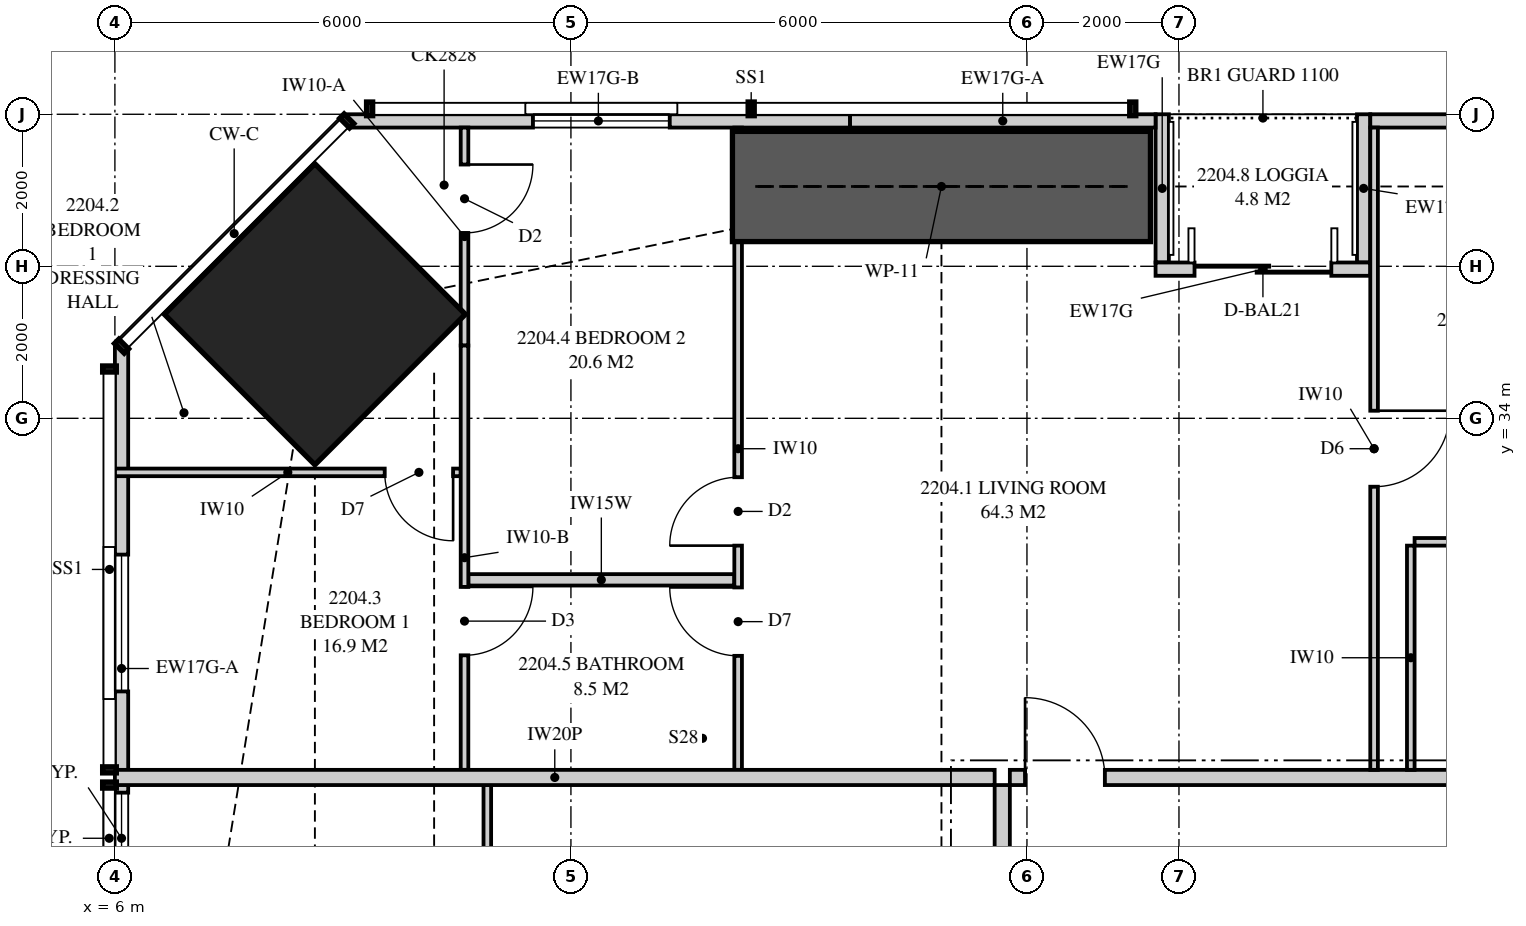
"""IFC4 building model, lengths in metres.
Left out: names, types, materials, properties, quantities, classifications, styles, units other than length and angle.
Written with IfcOpenShell. Run it as: python <this file> out.ifc"""

import sys

from ifc_helpers import new_model, si_unit, direction, frame, frame_2d, origin, origin_2d, place, context, subcontext, project, spatial, polyline, rectangle, hollow_rectangle, outline, extrude, element, fill, save


model = new_model("IFC4")
c1 = context("Model", 3, precision=1e-05, world=origin(), true_north=direction((0.0, 1.0)))
c2 = subcontext(c1, "Body", "Model", "MODEL_VIEW")
j1 = project(units=[si_unit("LENGTHUNIT", "METRE"), si_unit("PLANEANGLEUNIT", "RADIAN")], contexts=[c1])
p1 = place(None, origin())
s1 = spatial("IfcSite", under=j1, at=p1, CompositionType="ELEMENT")
p2 = place(p1, origin())
s2 = spatial("IfcBuilding", under=s1, at=p2, CompositionType="ELEMENT")
p3 = place(p2, frame((0.0, 0.0, 84.75)))
s3 = spatial("IfcBuildingStorey", under=s2, at=p3, CompositionType="ELEMENT", Elevation=84.75)
p4 = place(p3, frame((8.631, 35.369, 0.0), z_axis=(0.0, 0.0, 1.0), x_axis=(0.707106781187, -0.707106781187, 0.0)))
e1 = element("IfcColumn", 1, at=p4, inside=s3, PredefinedType="COLUMN", context=c2, shape_type="SweptSolid", body=[
    extrude(hollow_rectangle(XDim=2.8, YDim=2.8, WallThickness=0.175, at=origin_2d()), origin(), (0.0, 0.0, 1.0), 3.35),
])
p5 = place(p3, frame((30.675, 37.913, 0.0), z_axis=(0.0, 0.0, 1.0), x_axis=(-1.0, 0.0, 0.0)))
e2 = element("IfcWall", 2, at=p5, inside=s3, PredefinedType="SOLIDWALL", context=c2, shape_type="SweptSolid", body=[
    extrude(rectangle(XDim=8.158, YDim=0.175, at=frame_2d((4.079, 0.0))), origin(), (0.0, 0.0, 1.0), 2.15),
])
p6 = place(p5, frame((5.815, 0.0, 0.4)))
e3 = element("IfcOpeningElement", 3, at=p6, cuts=e2, PredefinedType="OPENING", context=c2, shape_type="SweptSolid", body=[
    extrude(rectangle(XDim=1.2, YDim=1.7, at=frame_2d((0.6, 0.85))), frame((0.0, 0.097, 0.0), z_axis=(0.0, -1.0, 0.0), x_axis=(1.0, 0.0, 0.0)), (0.0, 0.0, 1.0), 0.195),
])
p7 = place(p3, frame((19.692, 37.913, 0.0), z_axis=(0.0, 0.0, 1.0), x_axis=(-1.0, 0.0, 0.0)))
e4 = element("IfcWall", 4, at=p7, inside=s3, PredefinedType="SOLIDWALL", context=c2, shape_type="SweptSolid", body=[
    extrude(rectangle(XDim=4.021, YDim=0.175, at=frame_2d((2.011, 0.0))), origin(), (0.0, 0.0, 1.0), 2.15),
])
p8 = place(p3, frame((15.671, 37.913, 0.0), z_axis=(0.0, 0.0, 1.0), x_axis=(-1.0, 0.0, 0.0)))
e5 = element("IfcWall", 5, at=p8, inside=s3, PredefinedType="SOLIDWALL", context=c2, shape_type="SweptSolid", body=[
    extrude(rectangle(XDim=6.62, YDim=0.175, at=frame_2d((3.31, 0.0))), origin(), (0.0, 0.0, 1.0), 3.11),
])
p9 = place(p8, frame((2.371, 0.0, 0.4)))
e6 = element("IfcOpeningElement", 6, at=p9, cuts=e5, PredefinedType="OPENING", context=c2, shape_type="SweptSolid", body=[
    extrude(rectangle(XDim=1.8, YDim=1.7, at=frame_2d((0.9, 0.85))), frame((0.0, 0.097, 0.0), z_axis=(0.0, -1.0, 0.0), x_axis=(1.0, 0.0, 0.0)), (0.0, 0.0, 1.0), 0.195),
])
p10 = place(p3, frame((22.517, 35.962, 0.0), z_axis=(0.0, 0.0, 1.0), x_axis=(-1.0, 0.0, 0.0)))
e7 = element("IfcWall", 7, at=p10, inside=s3, PredefinedType="SOLIDWALL", context=c2, shape_type="SweptSolid", body=[
    extrude(rectangle(XDim=2.825, YDim=0.175, at=frame_2d((1.413, 0.0))), origin(), (0.0, 0.0, 1.0), 2.15),
])
p11 = place(p10, frame((0.512, 0.0, 0.0)))
e8 = element("IfcOpeningElement", 8, at=p11, cuts=e7, PredefinedType="OPENING", context=c2, shape_type="SweptSolid", body=[
    extrude(rectangle(XDim=1.8, YDim=2.1, at=frame_2d((0.9, 1.05))), frame((0.0, 0.097, 0.0), z_axis=(0.0, -1.0, 0.0), x_axis=(1.0, 0.0, 0.0)), (0.0, 0.0, 1.0), 0.195),
])
for number, where, z_axis, x_axis in (
    (9, (22.43, 38.0, 0.0), (0.0, 0.0, 1.0), (0.0, -1.0, 0.0)),
    (10, (19.78, 38.0, 0.0), (0.0, 0.0, 1.0), (0.0, -1.0, 0.0)),
):
    element("IfcWall", number, at=place(p3, frame(where, z_axis=z_axis, x_axis=x_axis)), inside=s3, PredefinedType="SOLIDWALL", context=c2, shape_type="SweptSolid", body=[
        extrude(rectangle(XDim=1.95, YDim=0.175, at=frame_2d((0.975, 0.0))), origin(), (0.0, 0.0, 1.0), 2.15),
    ])
p12 = place(p3, frame((6.087, 34.949, 0.0), z_axis=(0.0, 0.0, 1.0), x_axis=(0.0, -1.0, 0.0)))
e11 = element("IfcWall", 11, at=p12, inside=s3, PredefinedType="SOLIDWALL", context=c2, shape_type="SweptSolid", body=[
    extrude(rectangle(XDim=8.481, YDim=0.175, at=frame_2d((4.24, 0.0))), origin(), (0.0, 0.0, 1.0), 3.11),
])
p13 = place(p12, frame((2.742, 0.0, 0.4)))
e12 = element("IfcOpeningElement", 12, at=p13, cuts=e11, PredefinedType="OPENING", context=c2, shape_type="SweptSolid", body=[
    extrude(rectangle(XDim=1.8, YDim=1.7, at=frame_2d((0.9, 0.85))), frame((0.0, 0.097, 0.0), z_axis=(0.0, -1.0, 0.0), x_axis=(1.0, 0.0, 0.0)), (0.0, 0.0, 1.0), 0.195),
])
p14 = place(p12, frame((5.874, 0.0, 0.4)))
e13 = element("IfcOpeningElement", 13, at=p14, cuts=e11, PredefinedType="OPENING", context=c2, shape_type="SweptSolid", body=[
    extrude(rectangle(XDim=1.2, YDim=1.7, at=frame_2d((0.6, 0.85))), frame((0.0, 0.097, 0.0), z_axis=(0.0, -1.0, 0.0), x_axis=(1.0, 0.0, 0.0)), (0.0, 0.0, 1.0), 0.195),
])
p15 = place(p3, frame((17.775, 29.275, 0.0), z_axis=(0.0, 0.0, 1.0), x_axis=(1.0, 0.0, 0.0)))
e14 = element("IfcWall", 14, at=p15, inside=s3, PredefinedType="PARTITIONING", context=c2, shape_type="SweptSolid", body=[
    extrude(rectangle(XDim=8.875, YDim=0.2, at=frame_2d((4.438, 0.0))), origin(), (0.0, 0.0, 1.0), 3.11),
])
p16 = place(p15, frame((0.2, 0.0, 0.0)))
e15 = element("IfcOpeningElement", 15, at=p16, cuts=e14, PredefinedType="OPENING", context=c2, shape_type="SweptSolid", body=[
    extrude(rectangle(XDim=1.05, YDim=2.2, at=frame_2d((0.525, 1.1))), frame((0.0, 0.11, 0.0), z_axis=(0.0, -1.0, 0.0), x_axis=(1.0, 0.0, 0.0)), (0.0, 0.0, 1.0), 0.22),
])
p17 = place(p3, frame((10.6, 37.825, 0.0), z_axis=(0.0, 0.0, 1.0), x_axis=(0.0, -1.0, 0.0)))
e16 = element("IfcWall", 16, at=p17, inside=s3, PredefinedType="PARTITIONING", context=c2, shape_type="SweptSolid", body=[
    extrude(outline(polyline([(0.973, 2.15), (0.973, 3.11), (0.0, 3.11), (0.0, 0.0), (2.286, 0.0), (2.286, 0.051), (2.536, 0.051), (2.536, 0.0), (2.868, 0.0), (2.868, 2.15), (0.973, 2.15)])), frame((0.0, 0.05, 0.0), z_axis=(0.0, -1.0, 0.0), x_axis=(1.0, 0.0, 0.0)), (0.0, 0.0, 1.0), 0.1),
])
p18 = place(p17, frame((0.486, 0.0, 0.0)))
e17 = element("IfcOpeningElement", 17, at=p18, cuts=e16, PredefinedType="OPENING", context=c2, shape_type="SweptSolid", body=[
    extrude(rectangle(XDim=0.9, YDim=2.1, at=frame_2d((0.45, 1.05))), frame((0.0, 0.06, 0.0), z_axis=(0.0, -1.0, 0.0), x_axis=(1.0, 0.0, 0.0)), (0.0, 0.0, 1.0), 0.12),
])
p19 = place(p3, frame((10.6, 34.957, 0.0), z_axis=(0.0, 0.0, 1.0), x_axis=(0.0, -1.0, 0.0)))
e18 = element("IfcWall", 18, at=p19, inside=s3, PredefinedType="PARTITIONING", context=c2, shape_type="SweptSolid", body=[
    extrude(outline(polyline([(0.0, 0.0), (5.582, 0.0), (5.582, 2.51), (0.269, 2.51), (0.269, 2.15), (0.0, 2.15), (0.0, 0.0)])), frame((0.0, 0.05, 0.0), z_axis=(0.0, -1.0, 0.0), x_axis=(1.0, 0.0, 0.0)), (0.0, 0.0, 1.0), 0.1),
])
p20 = place(p19, frame((3.175, 0.0, 0.0)))
e19 = element("IfcOpeningElement", 19, at=p20, cuts=e18, PredefinedType="OPENING", context=c2, shape_type="SweptSolid", body=[
    extrude(rectangle(XDim=0.9, YDim=2.1, at=frame_2d((0.45, 1.05))), frame((0.0, 0.06, 0.0), z_axis=(0.0, -1.0, 0.0), x_axis=(1.0, 0.0, 0.0)), (0.0, 0.0, 1.0), 0.12),
])
p21 = place(p3, frame((14.2, 37.825, 0.0), z_axis=(0.0, 0.0, 1.0), x_axis=(0.0, -1.0, 0.0)))
e20 = element("IfcWall", 20, at=p21, inside=s3, PredefinedType="PARTITIONING", context=c2, shape_type="SweptSolid", body=[
    extrude(outline(polyline([(0.0, 0.0), (8.45, 0.0), (8.45, 3.11), (2.402, 3.11), (2.402, 2.15), (0.239, 2.15), (0.239, 3.11), (0.0, 3.11), (0.0, 0.0)])), frame((0.0, 0.05, 0.0), z_axis=(0.0, -1.0, 0.0), x_axis=(1.0, 0.0, 0.0)), (0.0, 0.0, 1.0), 0.1),
])
p22 = place(p21, frame((4.6, 0.0, 0.0)))
e21 = element("IfcOpeningElement", 21, at=p22, cuts=e20, PredefinedType="OPENING", context=c2, shape_type="SweptSolid", body=[
    extrude(rectangle(XDim=0.9, YDim=2.1, at=frame_2d((0.45, 1.05))), frame((0.0, 0.06, 0.0), z_axis=(0.0, -1.0, 0.0), x_axis=(1.0, 0.0, 0.0)), (0.0, 0.0, 1.0), 0.12),
])
p23 = place(p21, frame((6.05, 0.0, 0.0)))
e22 = element("IfcOpeningElement", 22, at=p23, cuts=e20, PredefinedType="OPENING", context=c2, shape_type="SweptSolid", body=[
    extrude(rectangle(XDim=0.9, YDim=2.1, at=frame_2d((0.45, 1.05))), frame((0.0, 0.06, 0.0), z_axis=(0.0, -1.0, 0.0), x_axis=(1.0, 0.0, 0.0)), (0.0, 0.0, 1.0), 0.12),
])
p24 = place(p3, frame((6.0, 33.289, 0.0), z_axis=(0.0, 0.0, 1.0), x_axis=(1.0, 0.0, 0.0)))
e23 = element("IfcWall", 23, at=p24, inside=s3, PredefinedType="PARTITIONING", context=c2, shape_type="SweptSolid", body=[
    extrude(outline(polyline([(0.0, 0.0), (4.55, 0.0), (4.55, 3.11), (4.55, 2.51), (3.368, 2.51), (3.368, 2.15), (1.22, 2.15), (1.22, 3.11), (0.0, 3.11), (0.0, 0.0)])), frame((0.0, 0.05, 0.0), z_axis=(0.0, -1.0, 0.0), x_axis=(1.0, 0.0, 0.0)), (0.0, 0.0, 1.0), 0.1),
])
p25 = place(p24, frame((3.55, 0.0, 0.0)))
e24 = element("IfcOpeningElement", 24, at=p25, cuts=e23, PredefinedType="OPENING", context=c2, shape_type="SweptSolid", body=[
    extrude(rectangle(XDim=0.9, YDim=2.1, at=frame_2d((0.45, 1.05))), frame((0.0, 0.06, 0.0), z_axis=(0.0, -1.0, 0.0), x_axis=(1.0, 0.0, 0.0)), (0.0, 0.0, 1.0), 0.12),
])
p26 = place(p3, frame((10.65, 31.875, 0.0), z_axis=(0.0, 0.0, 1.0), x_axis=(1.0, 0.0, 0.0)))
e25 = element("IfcWall", 25, at=p26, inside=s3, PredefinedType="PLUMBINGWALL", context=c2, shape_type="SweptSolid", body=[
    extrude(outline(polyline([(0.0, 0.0), (3.5, 0.0), (3.5, 3.11), (0.835, 3.11), (0.835, 2.51), (0.0, 2.51), (0.0, 3.11), (0.0, 0.0)])), frame((0.0, 0.075, 0.0), z_axis=(0.0, -1.0, 0.0), x_axis=(1.0, 0.0, 0.0)), (0.0, 0.0, 1.0), 0.15),
])
p27 = place(p3, frame((23.1, 32.375, 0.0), z_axis=(0.0, 0.0, 1.0), x_axis=(1.0, 0.0, 0.0)))
e26 = element("IfcWall", 26, at=p27, inside=s3, PredefinedType="PARTITIONING", context=c2, shape_type="SweptSolid", body=[
    extrude(rectangle(XDim=3.55, YDim=0.1, at=frame_2d((1.775, 0.0))), origin(), (0.0, 0.0, 1.0), 3.11),
])
p28 = place(p27, frame((1.3, 0.0, 0.0)))
e27 = element("IfcOpeningElement", 27, at=p28, cuts=e26, PredefinedType="OPENING", context=c2, shape_type="SweptSolid", body=[
    extrude(rectangle(XDim=0.9, YDim=2.1, at=frame_2d((0.45, 1.05))), frame((0.0, 0.06, 0.0), z_axis=(0.0, -1.0, 0.0), x_axis=(1.0, 0.0, 0.0)), (0.0, 0.0, 1.0), 0.12),
])
p29 = place(p3, frame((23.05, 32.325, 0.0), z_axis=(0.0, 0.0, 1.0), x_axis=(0.0, -1.0, 0.0)))
e28 = element("IfcWall", 28, at=p29, inside=s3, PredefinedType="PARTITIONING", context=c2, shape_type="SweptSolid", body=[
    extrude(rectangle(XDim=2.95, YDim=0.1, at=frame_2d((1.475, 0.0))), origin(), (0.0, 0.0, 1.0), 3.11),
])
p30 = place(p3, frame((22.567, 37.825, 0.0), z_axis=(0.0, 0.0, 1.0), x_axis=(0.0, -1.0, 0.0)))
e29 = element("IfcWall", 29, at=p30, inside=s3, PredefinedType="PARTITIONING", context=c2, shape_type="SweptSolid", body=[
    extrude(outline(polyline([(0.0, 0.0), (8.45, 0.0), (8.45, 3.11), (1.835, 3.11), (1.835, 2.15), (0.0, 2.15), (0.0, 3.11), (0.0, 0.0)])), frame((0.0, 0.05, 0.0), z_axis=(0.0, -1.0, 0.0), x_axis=(1.0, 0.0, 0.0)), (0.0, 0.0, 1.0), 0.1),
])
p31 = place(p30, frame((3.725, 0.0, 0.0)))
e30 = element("IfcOpeningElement", 30, at=p31, cuts=e29, PredefinedType="OPENING", context=c2, shape_type="SweptSolid", body=[
    extrude(rectangle(XDim=1.0, YDim=2.1, at=frame_2d((0.5, 1.05))), frame((0.0, 0.06, 0.0), z_axis=(0.0, -1.0, 0.0), x_axis=(1.0, 0.0, 0.0)), (0.0, 0.0, 1.0), 0.12),
])
p32 = place(p3, frame((6.0, 29.275, 0.0), z_axis=(0.0, 0.0, 1.0), x_axis=(1.0, 0.0, 0.0)))
e31 = element("IfcWall", 31, at=p32, inside=s3, PredefinedType="PARTITIONING", context=c2, shape_type="SweptSolid", body=[
    extrude(outline(polyline([(0.0, 0.0), (11.575, 0.0), (11.575, 3.11), (11.221, 3.11), (11.221, 2.531), (10.529, 2.531), (10.529, 3.11), (5.51, 3.11), (5.51, 2.51), (2.978, 2.51), (2.978, 2.531), (2.768, 2.531), (2.768, 2.15), (0.519, 2.15), (0.519, 3.11), (0.0, 3.11), (0.0, 0.0)])), frame((0.0, 0.1, 0.0), z_axis=(0.0, -1.0, 0.0), x_axis=(1.0, 0.0, 0.0)), (0.0, 0.0, 1.0), 0.2),
])
p33 = place(p3, frame((17.675, 19.7, 0.0), z_axis=(0.0, 0.0, 1.0), x_axis=(0.0, 1.0, 0.0)))
e32 = element("IfcWall", 32, at=p33, inside=s3, PredefinedType="PARTITIONING", context=c2, shape_type="SweptSolid", body=[
    extrude(outline(polyline([(0.0, 0.0), (9.475, 0.0), (9.475, 3.11), (7.071, 3.11), (7.071, 2.531), (6.379, 2.531), (6.379, 3.11), (0.0, 3.11), (0.0, 0.0)])), frame((0.0, 0.1, 0.0), z_axis=(0.0, -1.0, 0.0), x_axis=(1.0, 0.0, 0.0)), (0.0, 0.0, 1.0), 0.2),
])
p34 = place(p3, frame((10.9, 23.292, 0.0), z_axis=(0.0, 0.0, 1.0), x_axis=(0.0, 1.0, 0.0)))
e33 = element("IfcWall", 33, at=p34, inside=s3, PredefinedType="PARTITIONING", context=c2, shape_type="SweptSolid", body=[
    extrude(outline(polyline([(0.0, 0.0), (5.883, 0.0), (5.883, 3.11), (5.883, 2.51), (1.768, 2.51), (0.0, 2.51), (0.0, 3.11), (0.0, 0.0)])), frame((0.0, 0.05, 0.0), z_axis=(0.0, -1.0, 0.0), x_axis=(1.0, 0.0, 0.0)), (0.0, 0.0, 1.0), 0.1),
])
p35 = place(p34, frame((0.15, 0.0, 0.0)))
e34 = element("IfcOpeningElement", 34, at=p35, cuts=e33, PredefinedType="OPENING", context=c2, shape_type="SweptSolid", body=[
    extrude(rectangle(XDim=0.9, YDim=2.1, at=frame_2d((0.45, 1.05))), frame((0.0, 0.06, 0.0), z_axis=(0.0, -1.0, 0.0), x_axis=(1.0, 0.0, 0.0)), (0.0, 0.0, 1.0), 0.12),
])
p36 = place(p34, frame((4.017, 0.0, 0.0)))
e35 = element("IfcOpeningElement", 35, at=p36, cuts=e33, PredefinedType="OPENING", context=c2, shape_type="SweptSolid", body=[
    extrude(rectangle(XDim=0.9, YDim=2.1, at=frame_2d((0.45, 1.05))), frame((0.0, 0.06, 0.0), z_axis=(0.0, -1.0, 0.0), x_axis=(1.0, 0.0, 0.0)), (0.0, 0.0, 1.0), 0.12),
])
p37 = place(p3, frame((14.125, 37.05, 0.0), z_axis=(0.0, 0.0, 1.0), x_axis=(1.0, 0.0, 0.0)))
e36 = element("IfcWall", 36, at=p37, inside=s3, PredefinedType="SHEAR", context=c2, shape_type="SweptSolid", body=[
    extrude(rectangle(XDim=5.5, YDim=1.45, at=frame_2d((2.75, 0.0))), origin(), (0.0, 0.0, 1.0), 3.35),
])
p38 = place(p11, origin())
e37 = element("IfcDoor", 37, at=p38, inside=s3, OperationType="SLIDING_TO_LEFT", PredefinedType="DOOR", context=c2, shape_type="SweptSolid", body=[
    extrude(rectangle(XDim=1.8, YDim=2.1, at=frame_2d((0.9, 1.05))), frame((0.0, 0.025, 0.0), z_axis=(0.0, -1.0, 0.0), x_axis=(1.0, 0.0, 0.0)), (0.0, 0.0, 1.0), 0.05),
])
fill(e8, e37)
p39 = place(p9, origin())
e38 = element("IfcWindow", 38, at=p39, inside=s3, PartitioningType="SINGLE_PANEL", PredefinedType="WINDOW", context=c2, shape_type="SweptSolid", body=[
    extrude(rectangle(XDim=1.8, YDim=1.7, at=frame_2d((0.9, 0.85))), frame((0.0, 0.03, 0.0), z_axis=(0.0, -1.0, 0.0), x_axis=(1.0, 0.0, 0.0)), (0.0, 0.0, 1.0), 0.06),
])
fill(e6, e38)
p40 = place(p13, origin())
e39 = element("IfcWindow", 39, at=p40, inside=s3, PartitioningType="SINGLE_PANEL", PredefinedType="WINDOW", context=c2, shape_type="SweptSolid", body=[
    extrude(rectangle(XDim=1.8, YDim=1.7, at=frame_2d((0.9, 0.85))), frame((0.0, 0.03, 0.0), z_axis=(0.0, -1.0, 0.0), x_axis=(1.0, 0.0, 0.0)), (0.0, 0.0, 1.0), 0.06),
])
fill(e12, e39)
p41 = place(p14, origin())
e40 = element("IfcWindow", 40, at=p41, inside=s3, PartitioningType="SINGLE_PANEL", PredefinedType="WINDOW", context=c2, shape_type="SweptSolid", body=[
    extrude(rectangle(XDim=1.2, YDim=1.7, at=frame_2d((0.6, 0.85))), frame((0.0, 0.03, 0.0), z_axis=(0.0, -1.0, 0.0), x_axis=(1.0, 0.0, 0.0)), (0.0, 0.0, 1.0), 0.06),
])
fill(e13, e40)
p42 = place(p16, origin())
e41 = element("IfcDoor", 41, at=p42, inside=s3, OperationType="SINGLE_SWING_LEFT", PredefinedType="DOOR", context=c2, shape_type="SweptSolid", body=[
    extrude(rectangle(XDim=1.05, YDim=2.2, at=frame_2d((0.525, 1.1))), frame((0.0, 0.025, 0.0), z_axis=(0.0, -1.0, 0.0), x_axis=(1.0, 0.0, 0.0)), (0.0, 0.0, 1.0), 0.05),
])
fill(e15, e41)
p43 = place(p25, frame((0.9, 0.0, 0.0), z_axis=(0.0, 0.0, 1.0), x_axis=(-1.0, 0.0, 0.0)))
e42 = element("IfcDoor", 42, at=p43, inside=s3, OperationType="SINGLE_SWING_LEFT", PredefinedType="DOOR", context=c2, shape_type="SweptSolid", body=[
    extrude(rectangle(XDim=0.9, YDim=2.1, at=frame_2d((0.45, 1.05))), frame((0.0, 0.025, 0.0), z_axis=(0.0, -1.0, 0.0), x_axis=(1.0, 0.0, 0.0)), (0.0, 0.0, 1.0), 0.05),
])
fill(e24, e42)
p44 = place(p18, origin())
e43 = element("IfcDoor", 43, at=p44, inside=s3, OperationType="SINGLE_SWING_LEFT", PredefinedType="DOOR", context=c2, shape_type="SweptSolid", body=[
    extrude(rectangle(XDim=0.9, YDim=2.1, at=frame_2d((0.45, 1.05))), frame((0.0, 0.025, 0.0), z_axis=(0.0, -1.0, 0.0), x_axis=(1.0, 0.0, 0.0)), (0.0, 0.0, 1.0), 0.05),
])
fill(e17, e43)
p45 = place(p22, frame((0.9, 0.0, 0.0), z_axis=(0.0, 0.0, 1.0), x_axis=(-1.0, 0.0, 0.0)))
e44 = element("IfcDoor", 44, at=p45, inside=s3, OperationType="SINGLE_SWING_LEFT", PredefinedType="DOOR", context=c2, shape_type="SweptSolid", body=[
    extrude(rectangle(XDim=0.9, YDim=2.1, at=frame_2d((0.45, 1.05))), frame((0.0, 0.025, 0.0), z_axis=(0.0, -1.0, 0.0), x_axis=(1.0, 0.0, 0.0)), (0.0, 0.0, 1.0), 0.05),
])
fill(e21, e44)
p46 = place(p23, frame((0.9, 0.0, 0.0), z_axis=(0.0, 0.0, 1.0), x_axis=(-1.0, 0.0, 0.0)))
e45 = element("IfcDoor", 45, at=p46, inside=s3, OperationType="SINGLE_SWING_RIGHT", PredefinedType="DOOR", context=c2, shape_type="SweptSolid", body=[
    extrude(rectangle(XDim=0.9, YDim=2.1, at=frame_2d((0.45, 1.05))), frame((0.0, 0.025, 0.0), z_axis=(0.0, -1.0, 0.0), x_axis=(1.0, 0.0, 0.0)), (0.0, 0.0, 1.0), 0.05),
])
fill(e22, e45)
p47 = place(p20, origin())
e46 = element("IfcDoor", 46, at=p47, inside=s3, OperationType="SINGLE_SWING_LEFT", PredefinedType="DOOR", context=c2, shape_type="SweptSolid", body=[
    extrude(rectangle(XDim=0.9, YDim=2.1, at=frame_2d((0.45, 1.05))), frame((0.0, 0.025, 0.0), z_axis=(0.0, -1.0, 0.0), x_axis=(1.0, 0.0, 0.0)), (0.0, 0.0, 1.0), 0.05),
])
fill(e19, e46)
p48 = place(p31, origin())
e47 = element("IfcDoor", 47, at=p48, inside=s3, OperationType="SINGLE_SWING_LEFT", PredefinedType="DOOR", context=c2, shape_type="SweptSolid", body=[
    extrude(rectangle(XDim=1.0, YDim=2.1, at=frame_2d((0.5, 1.05))), frame((0.0, 0.025, 0.0), z_axis=(0.0, -1.0, 0.0), x_axis=(1.0, 0.0, 0.0)), (0.0, 0.0, 1.0), 0.05),
])
fill(e30, e47)
save(model, sys.argv[1])
